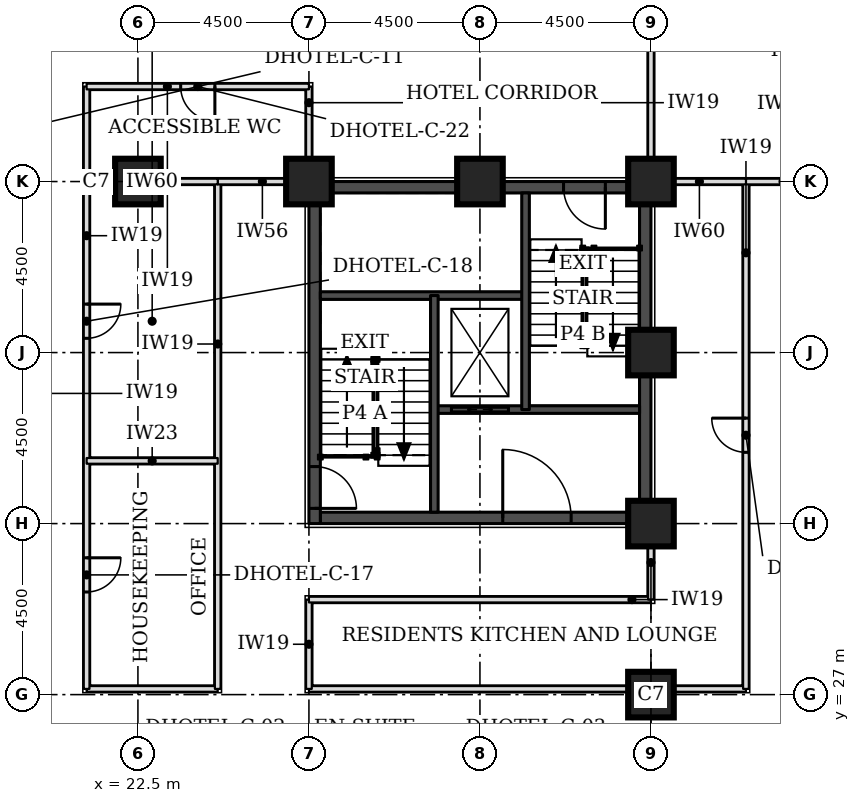
"""IFC4 building model, lengths in metres.
Left out: names, types, materials, properties, quantities, classifications, styles, units other than length and angle.
Written with IfcOpenShell. Run it as: python <this file> out.ifc"""

import sys

from ifc_helpers import new_model, si_unit, direction, frame, frame_2d, origin, origin_2d, place, context, subcontext, project, spatial, rectangle, extrude, element, fill, save


model = new_model("IFC4")
c1 = context("Model", 3, precision=1e-05, world=origin(), true_north=direction((0.0, 1.0)))
c2 = subcontext(c1, "Body", "Model", "MODEL_VIEW")
j1 = project(units=[si_unit("LENGTHUNIT", "METRE"), si_unit("PLANEANGLEUNIT", "RADIAN")], contexts=[c1])
p1 = place(None, origin())
s1 = spatial("IfcSite", under=j1, at=p1, CompositionType="ELEMENT")
p2 = place(p1, origin())
s2 = spatial("IfcBuilding", under=s1, at=p2, CompositionType="ELEMENT")
p3 = place(p2, frame((0.0, 0.0, 33.0)))
s3 = spatial("IfcBuildingStorey", under=s2, at=p3, CompositionType="ELEMENT", Elevation=33.0)
for number, where, z_axis, x_axis in (
    (1, (36.0, 27.0, 0.0), (0.0, 0.0, 1.0), (1.0, 0.0, 0.0)),
    (2, (36.0, 31.5, 0.0), (0.0, 0.0, 1.0), (1.0, 0.0, 0.0)),
    (3, (36.0, 36.0, 0.0), (0.0, 0.0, 1.0), (1.0, 0.0, 0.0)),
    (4, (22.5, 40.5, 0.0), (0.0, 0.0, 1.0), (1.0, 0.0, 0.0)),
    (5, (27.0, 40.5, 0.0), (0.0, 0.0, 1.0), (1.0, 0.0, 0.0)),
    (6, (31.5, 40.5, 0.0), (0.0, 0.0, 1.0), (1.0, 0.0, 0.0)),
    (7, (36.0, 40.5, 0.0), (0.0, 0.0, 1.0), (1.0, 0.0, 0.0)),
):
    element("IfcColumn", number, at=place(p3, frame(where, z_axis=z_axis, x_axis=x_axis)), inside=s3, PredefinedType="COLUMN", context=c2, shape_type="SweptSolid", body=[
        extrude(rectangle(XDim=1.2, YDim=1.2, at=origin_2d()), origin(), (0.0, 0.0, 1.0), 3.3),
    ])
p4 = place(p3, frame((27.3, 31.65, 0.0), z_axis=(0.0, 0.0, 1.0), x_axis=(1.0, 0.0, 0.0)))
e8 = element("IfcWall", 8, at=p4, inside=s3, PredefinedType="SHEAR", context=c2, shape_type="SweptSolid", body=[
    extrude(rectangle(XDim=8.4, YDim=0.3, at=frame_2d((4.2, 0.0))), origin(), (0.0, 0.0, 1.0), 3.3),
])
p5 = place(p4, frame((4.8, 0.0, 0.0)))
e9 = element("IfcOpeningElement", 9, at=p5, cuts=e8, PredefinedType="OPENING", context=c2, shape_type="SweptSolid", body=[
    extrude(rectangle(XDim=1.8, YDim=2.1, at=frame_2d((0.9, 1.05))), frame((0.0, 0.16, 0.0), z_axis=(0.0, -1.0, 0.0), x_axis=(1.0, 0.0, 0.0)), (0.0, 0.0, 1.0), 0.32),
])
p6 = place(p3, frame((27.3, 40.35, 0.0), z_axis=(0.0, 0.0, 1.0), x_axis=(1.0, 0.0, 0.0)))
e10 = element("IfcWall", 10, at=p6, inside=s3, PredefinedType="SHEAR", context=c2, shape_type="SweptSolid", body=[
    extrude(rectangle(XDim=8.4, YDim=0.3, at=frame_2d((4.2, 0.0))), origin(), (0.0, 0.0, 1.0), 3.3),
])
p7 = place(p6, frame((6.4, 0.0, 0.0)))
e11 = element("IfcOpeningElement", 11, at=p7, cuts=e10, PredefinedType="OPENING", context=c2, shape_type="SweptSolid", body=[
    extrude(rectangle(XDim=1.1, YDim=2.1, at=frame_2d((0.55, 1.05))), frame((0.0, 0.16, 0.0), z_axis=(0.0, -1.0, 0.0), x_axis=(1.0, 0.0, 0.0)), (0.0, 0.0, 1.0), 0.32),
])
p8 = place(p3, frame((27.15, 31.5, 0.0), z_axis=(0.0, 0.0, 1.0), x_axis=(0.0, 1.0, 0.0)))
e12 = element("IfcWall", 12, at=p8, inside=s3, PredefinedType="SHEAR", context=c2, shape_type="SweptSolid", body=[
    extrude(rectangle(XDim=9.0, YDim=0.3, at=frame_2d((4.5, 0.0))), origin(), (0.0, 0.0, 1.0), 3.3),
])
p9 = place(p8, frame((0.4, 0.0, 0.0)))
e13 = element("IfcOpeningElement", 13, at=p9, cuts=e12, PredefinedType="OPENING", context=c2, shape_type="SweptSolid", body=[
    extrude(rectangle(XDim=1.1, YDim=2.1, at=frame_2d((0.55, 1.05))), frame((0.0, 0.16, 0.0), z_axis=(0.0, -1.0, 0.0), x_axis=(1.0, 0.0, 0.0)), (0.0, 0.0, 1.0), 0.32),
])
p10 = place(p3, frame((35.85, 31.5, 0.0), z_axis=(0.0, 0.0, 1.0), x_axis=(0.0, 1.0, 0.0)))
e14 = element("IfcWall", 14, at=p10, inside=s3, PredefinedType="SHEAR", context=c2, shape_type="SweptSolid", body=[
    extrude(rectangle(XDim=9.0, YDim=0.3, at=frame_2d((4.5, 0.0))), origin(), (0.0, 0.0, 1.0), 3.3),
])
p11 = place(p3, frame((21.15, 27.15, 0.0), z_axis=(0.0, 0.0, 1.0), x_axis=(1.0, 0.0, 0.0)))
e15 = element("IfcWall", 15, at=p11, inside=s3, PredefinedType="PARTITIONING", context=c2, shape_type="SweptSolid", body=[
    extrude(rectangle(XDim=3.45, YDim=0.15, at=frame_2d((1.725, 0.0))), origin(), (0.0, 0.0, 1.0), 3.08),
])
p12 = place(p3, frame((21.15, 27.15, 0.0), z_axis=(0.0, 0.0, 1.0), x_axis=(0.0, 1.0, 0.0)))
e16 = element("IfcWall", 16, at=p12, inside=s3, PredefinedType="PARTITIONING", context=c2, shape_type="SweptSolid", body=[
    extrude(rectangle(XDim=15.85, YDim=0.15, at=frame_2d((7.925, 0.0))), origin(), (0.0, 0.0, 1.0), 3.08),
])
p13 = place(p12, frame((2.55, 0.0, 0.0)))
e17 = element("IfcOpeningElement", 17, at=p13, cuts=e16, PredefinedType="OPENING", context=c2, shape_type="SweptSolid", body=[
    extrude(rectangle(XDim=0.9, YDim=2.1, at=frame_2d((0.45, 1.05))), frame((0.0, 0.085, 0.0), z_axis=(0.0, -1.0, 0.0), x_axis=(1.0, 0.0, 0.0)), (0.0, 0.0, 1.0), 0.17),
])
p14 = place(p12, frame((9.225, 0.0, 0.0)))
e18 = element("IfcOpeningElement", 18, at=p14, cuts=e16, PredefinedType="OPENING", context=c2, shape_type="SweptSolid", body=[
    extrude(rectangle(XDim=0.9, YDim=2.1, at=frame_2d((0.45, 1.05))), frame((0.0, 0.085, 0.0), z_axis=(0.0, -1.0, 0.0), x_axis=(1.0, 0.0, 0.0)), (0.0, 0.0, 1.0), 0.17),
])
p15 = place(p3, frame((24.6, 27.15, 0.0), z_axis=(0.0, 0.0, 1.0), x_axis=(0.0, 1.0, 0.0)))
e19 = element("IfcWall", 19, at=p15, inside=s3, PredefinedType="PARTITIONING", context=c2, shape_type="SweptSolid", body=[
    extrude(rectangle(XDim=13.35, YDim=0.15, at=frame_2d((6.675, 0.0))), origin(), (0.0, 0.0, 1.0), 3.08),
])
p16 = place(p3, frame((27.0, 27.15, 0.0), z_axis=(0.0, 0.0, 1.0), x_axis=(1.0, 0.0, 0.0)))
e20 = element("IfcWall", 20, at=p16, inside=s3, PredefinedType="PARTITIONING", context=c2, shape_type="SweptSolid", body=[
    extrude(rectangle(XDim=11.5, YDim=0.15, at=frame_2d((5.75, 0.0))), origin(), (0.0, 0.0, 1.0), 3.08),
])
p17 = place(p3, frame((27.0, 27.15, 0.0), z_axis=(0.0, 0.0, 1.0), x_axis=(0.0, 1.0, 0.0)))
e21 = element("IfcWall", 21, at=p17, inside=s3, PredefinedType="PARTITIONING", context=c2, shape_type="SweptSolid", body=[
    extrude(rectangle(XDim=2.35, YDim=0.15, at=frame_2d((1.175, 0.0))), origin(), (0.0, 0.0, 1.0), 3.08),
])
p18 = place(p3, frame((38.5, 27.15, 0.0), z_axis=(0.0, 0.0, 1.0), x_axis=(0.0, 1.0, 0.0)))
e22 = element("IfcWall", 22, at=p18, inside=s3, PredefinedType="PARTITIONING", context=c2, shape_type="SweptSolid", body=[
    extrude(rectangle(XDim=13.35, YDim=0.15, at=frame_2d((6.675, 0.0))), origin(), (0.0, 0.0, 1.0), 3.08),
])
p19 = place(p18, frame((6.225, 0.0, 0.0)))
e23 = element("IfcOpeningElement", 23, at=p19, cuts=e22, PredefinedType="OPENING", context=c2, shape_type="SweptSolid", body=[
    extrude(rectangle(XDim=0.9, YDim=2.1, at=frame_2d((0.45, 1.05))), frame((0.0, 0.085, 0.0), z_axis=(0.0, -1.0, 0.0), x_axis=(1.0, 0.0, 0.0)), (0.0, 0.0, 1.0), 0.17),
])
p20 = place(p3, frame((27.0, 29.5, 0.0), z_axis=(0.0, 0.0, 1.0), x_axis=(1.0, 0.0, 0.0)))
e24 = element("IfcWall", 24, at=p20, inside=s3, PredefinedType="PARTITIONING", context=c2, shape_type="SweptSolid", body=[
    extrude(rectangle(XDim=9.0, YDim=0.15, at=frame_2d((4.5, 0.0))), origin(), (0.0, 0.0, 1.0), 3.08),
])
p21 = place(p3, frame((36.0, 29.5, 0.0), z_axis=(0.0, 0.0, 1.0), x_axis=(0.0, 1.0, 0.0)))
e25 = element("IfcWall", 25, at=p21, inside=s3, PredefinedType="PARTITIONING", context=c2, shape_type="SweptSolid", body=[
    extrude(rectangle(XDim=1.95, YDim=0.15, at=frame_2d((0.975, 0.0))), origin(), (0.0, 0.0, 1.0), 2.33),
])
p22 = place(p3, frame((24.6, 40.5, 0.0), z_axis=(0.0, 0.0, 1.0), x_axis=(1.0, 0.0, 0.0)))
e26 = element("IfcWall", 26, at=p22, inside=s3, PredefinedType="PARTITIONING", context=c2, shape_type="SweptSolid", body=[
    extrude(rectangle(XDim=2.35, YDim=0.15, at=frame_2d((1.175, 0.0))), origin(), (0.0, 0.0, 1.0), 2.33),
])
p23 = place(p3, frame((38.5, 40.5, 0.0), z_axis=(0.0, 0.0, 1.0), x_axis=(1.0, 0.0, 0.0)))
e27 = element("IfcWall", 27, at=p23, inside=s3, PredefinedType="PARTITIONING", context=c2, shape_type="SweptSolid", body=[
    extrude(rectangle(XDim=1.95, YDim=0.15, at=frame_2d((0.975, 0.0))), origin(), (0.0, 0.0, 1.0), 2.33),
])
p24 = place(p3, frame((27.0, 40.55, 0.0), z_axis=(0.0, 0.0, 1.0), x_axis=(0.0, 1.0, 0.0)))
e28 = element("IfcWall", 28, at=p24, inside=s3, PredefinedType="PARTITIONING", context=c2, shape_type="SweptSolid", body=[
    extrude(rectangle(XDim=2.45, YDim=0.15, at=frame_2d((1.225, 0.0))), origin(), (0.0, 0.0, 1.0), 3.08),
])
p25 = place(p3, frame((36.0, 40.55, 0.0), z_axis=(0.0, 0.0, 1.0), x_axis=(0.0, 1.0, 0.0)))
e29 = element("IfcWall", 29, at=p25, inside=s3, PredefinedType="PARTITIONING", context=c2, shape_type="SweptSolid", body=[
    extrude(rectangle(XDim=4.4, YDim=0.15, at=frame_2d((2.2, 0.0))), origin(), (0.0, 0.0, 1.0), 2.33),
])
p26 = place(p3, frame((21.15, 43.0, 0.0), z_axis=(0.0, 0.0, 1.0), x_axis=(1.0, 0.0, 0.0)))
e30 = element("IfcWall", 30, at=p26, inside=s3, PredefinedType="PARTITIONING", context=c2, shape_type="SweptSolid", body=[
    extrude(rectangle(XDim=5.85, YDim=0.15, at=frame_2d((2.925, 0.0))), origin(), (0.0, 0.0, 1.0), 3.08),
])
p27 = place(p26, frame((2.475, 0.0, 0.0)))
e31 = element("IfcOpeningElement", 31, at=p27, cuts=e30, PredefinedType="OPENING", context=c2, shape_type="SweptSolid", body=[
    extrude(rectangle(XDim=0.9, YDim=2.1, at=frame_2d((0.45, 1.05))), frame((0.0, 0.085, 0.0), z_axis=(0.0, -1.0, 0.0), x_axis=(1.0, 0.0, 0.0)), (0.0, 0.0, 1.0), 0.17),
])
p28 = place(p3, frame((21.15, 33.15, 0.0), z_axis=(0.0, 0.0, 1.0), x_axis=(1.0, 0.0, 0.0)))
e32 = element("IfcWall", 32, at=p28, inside=s3, PredefinedType="PARTITIONING", context=c2, shape_type="SweptSolid", body=[
    extrude(rectangle(XDim=3.45, YDim=0.15, at=frame_2d((1.725, 0.0))), origin(), (0.0, 0.0, 1.0), 3.08),
])
p29 = place(p3, frame((21.15, 40.5, 0.0), z_axis=(0.0, 0.0, 1.0), x_axis=(1.0, 0.0, 0.0)))
e33 = element("IfcWall", 33, at=p29, inside=s3, PredefinedType="PARTITIONING", context=c2, shape_type="SweptSolid", body=[
    extrude(rectangle(XDim=3.45, YDim=0.15, at=frame_2d((1.725, 0.0))), origin(), (0.0, 0.0, 1.0), 2.33),
])
p30 = place(p3, frame((36.05, 40.5, 0.0), z_axis=(0.0, 0.0, 1.0), x_axis=(1.0, 0.0, 0.0)))
e34 = element("IfcWall", 34, at=p30, inside=s3, PredefinedType="PARTITIONING", context=c2, shape_type="SweptSolid", body=[
    extrude(rectangle(XDim=2.45, YDim=0.15, at=frame_2d((1.225, 0.0))), origin(), (0.0, 0.0, 1.0), 2.33),
])
p31 = place(p3, frame((30.3, 34.5, 0.0), z_axis=(0.0, 0.0, 1.0), x_axis=(1.0, 0.0, 0.0)))
e35 = element("IfcWall", 35, at=p31, inside=s3, PredefinedType="SOLIDWALL", context=c2, shape_type="SweptSolid", body=[
    extrude(rectangle(XDim=5.4, YDim=0.2, at=frame_2d((2.7, 0.0))), origin(), (0.0, 0.0, 1.0), 3.08),
])
p32 = place(p31, frame((0.45, 0.0, 0.0)))
e36 = element("IfcOpeningElement", 36, at=p32, cuts=e35, PredefinedType="OPENING", context=c2, shape_type="SweptSolid", body=[
    extrude(rectangle(XDim=1.5, YDim=2.1, at=frame_2d((0.75, 1.05))), frame((0.0, 0.11, 0.0), z_axis=(0.0, -1.0, 0.0), x_axis=(1.0, 0.0, 0.0)), (0.0, 0.0, 1.0), 0.22),
])
p33 = place(p3, frame((27.3, 37.5, 0.0), z_axis=(0.0, 0.0, 1.0), x_axis=(1.0, 0.0, 0.0)))
e37 = element("IfcWall", 37, at=p33, inside=s3, PredefinedType="SOLIDWALL", context=c2, shape_type="SweptSolid", body=[
    extrude(rectangle(XDim=5.4, YDim=0.2, at=frame_2d((2.7, 0.0))), origin(), (0.0, 0.0, 1.0), 3.08),
])
for number, where, z_axis, x_axis in (
    (38, (30.3, 31.8, 0.0), (0.0, 0.0, 1.0), (0.0, 1.0, 0.0)),
    (39, (32.7, 34.5, 0.0), (0.0, 0.0, 1.0), (0.0, 1.0, 0.0)),
):
    element("IfcWall", number, at=place(p3, frame(where, z_axis=z_axis, x_axis=x_axis)), inside=s3, PredefinedType="SOLIDWALL", context=c2, shape_type="SweptSolid", body=[
        extrude(rectangle(XDim=5.7, YDim=0.2, at=frame_2d((2.85, 0.0))), origin(), (0.0, 0.0, 1.0), 3.08),
    ])
p34 = place(p13, frame((0.9, 0.0, 0.0), z_axis=(0.0, 0.0, 1.0), x_axis=(-1.0, 0.0, 0.0)))
e40 = element("IfcDoor", 40, at=p34, inside=s3, OperationType="SINGLE_SWING_LEFT", PredefinedType="DOOR", context=c2, shape_type="SweptSolid", body=[
    extrude(rectangle(XDim=0.9, YDim=2.1, at=frame_2d((0.45, 1.05))), frame((0.0, 0.025, 0.0), z_axis=(0.0, -1.0, 0.0), x_axis=(1.0, 0.0, 0.0)), (0.0, 0.0, 1.0), 0.05),
])
fill(e17, e40)
p35 = place(p14, frame((0.9, 0.0, 0.0), z_axis=(0.0, 0.0, 1.0), x_axis=(-1.0, 0.0, 0.0)))
e41 = element("IfcDoor", 41, at=p35, inside=s3, OperationType="SINGLE_SWING_LEFT", PredefinedType="DOOR", context=c2, shape_type="SweptSolid", body=[
    extrude(rectangle(XDim=0.9, YDim=2.1, at=frame_2d((0.45, 1.05))), frame((0.0, 0.025, 0.0), z_axis=(0.0, -1.0, 0.0), x_axis=(1.0, 0.0, 0.0)), (0.0, 0.0, 1.0), 0.05),
])
fill(e18, e41)
p36 = place(p19, origin())
e42 = element("IfcDoor", 42, at=p36, inside=s3, OperationType="SINGLE_SWING_RIGHT", PredefinedType="DOOR", context=c2, shape_type="SweptSolid", body=[
    extrude(rectangle(XDim=0.9, YDim=2.1, at=frame_2d((0.45, 1.05))), frame((0.0, 0.025, 0.0), z_axis=(0.0, -1.0, 0.0), x_axis=(1.0, 0.0, 0.0)), (0.0, 0.0, 1.0), 0.05),
])
fill(e23, e42)
p37 = place(p27, frame((0.9, 0.0, 0.0), z_axis=(0.0, 0.0, 1.0), x_axis=(-1.0, 0.0, 0.0)))
e43 = element("IfcDoor", 43, at=p37, inside=s3, OperationType="SINGLE_SWING_LEFT", PredefinedType="DOOR", context=c2, shape_type="SweptSolid", body=[
    extrude(rectangle(XDim=0.9, YDim=2.1, at=frame_2d((0.45, 1.05))), frame((0.0, 0.025, 0.0), z_axis=(0.0, -1.0, 0.0), x_axis=(1.0, 0.0, 0.0)), (0.0, 0.0, 1.0), 0.05),
])
fill(e31, e43)
p38 = place(p9, frame((1.1, 0.0, 0.0), z_axis=(0.0, 0.0, 1.0), x_axis=(-1.0, 0.0, 0.0)))
e44 = element("IfcDoor", 44, at=p38, inside=s3, OperationType="SINGLE_SWING_RIGHT", PredefinedType="DOOR", context=c2, shape_type="SweptSolid", body=[
    extrude(rectangle(XDim=1.1, YDim=2.1, at=frame_2d((0.55, 1.05))), frame((0.0, 0.025, 0.0), z_axis=(0.0, -1.0, 0.0), x_axis=(1.0, 0.0, 0.0)), (0.0, 0.0, 1.0), 0.05),
])
fill(e13, e44)
p39 = place(p7, frame((1.1, 0.0, 0.0), z_axis=(0.0, 0.0, 1.0), x_axis=(-1.0, 0.0, 0.0)))
e45 = element("IfcDoor", 45, at=p39, inside=s3, OperationType="SINGLE_SWING_LEFT", PredefinedType="DOOR", context=c2, shape_type="SweptSolid", body=[
    extrude(rectangle(XDim=1.1, YDim=2.1, at=frame_2d((0.55, 1.05))), frame((0.0, 0.025, 0.0), z_axis=(0.0, -1.0, 0.0), x_axis=(1.0, 0.0, 0.0)), (0.0, 0.0, 1.0), 0.05),
])
fill(e11, e45)
p40 = place(p32, origin())
e46 = element("IfcDoor", 46, at=p40, inside=s3, OperationType="DOUBLE_DOOR_SLIDING", PredefinedType="DOOR", context=c2, shape_type="SweptSolid", body=[
    extrude(rectangle(XDim=1.5, YDim=2.1, at=frame_2d((0.75, 1.05))), frame((0.0, 0.025, 0.0), z_axis=(0.0, -1.0, 0.0), x_axis=(1.0, 0.0, 0.0)), (0.0, 0.0, 1.0), 0.05),
])
fill(e36, e46)
p41 = place(p5, origin())
e47 = element("IfcDoor", 47, at=p41, inside=s3, OperationType="SINGLE_SWING_LEFT", PredefinedType="DOOR", context=c2, shape_type="SweptSolid", body=[
    extrude(rectangle(XDim=1.8, YDim=2.1, at=frame_2d((0.9, 1.05))), frame((0.0, 0.025, 0.0), z_axis=(0.0, -1.0, 0.0), x_axis=(1.0, 0.0, 0.0)), (0.0, 0.0, 1.0), 0.05),
])
fill(e9, e47)
save(model, sys.argv[1])
